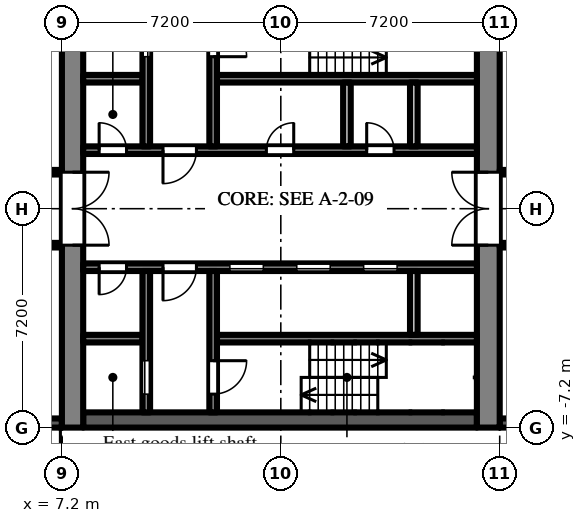
"""IFC4 building model, lengths in metres.
Left out: names, types, materials, properties, quantities, classifications, styles, units other than length and angle.
Written with IfcOpenShell. Run it as: python <this file> out.ifc"""

import sys

from ifc_helpers import new_model, si_unit, direction, frame, frame_2d, origin, place, context, subcontext, project, spatial, rectangle, extrude, element, fill, save


model = new_model("IFC4")
c1 = context("Model", 3, precision=1e-05, world=origin(), true_north=direction((0.0, 1.0)))
c2 = subcontext(c1, "Body", "Model", "MODEL_VIEW")
j1 = project(units=[si_unit("LENGTHUNIT", "METRE"), si_unit("PLANEANGLEUNIT", "RADIAN")], contexts=[c1])
p1 = place(None, origin())
s1 = spatial("IfcSite", under=j1, at=p1, CompositionType="ELEMENT")
p2 = place(p1, origin())
s2 = spatial("IfcBuilding", under=s1, at=p2, CompositionType="ELEMENT")
p3 = place(p2, frame((0.0, 0.0, 53.7)))
s3 = spatial("IfcBuildingStorey", under=s2, at=p3, CompositionType="ELEMENT", Elevation=53.7)
p4 = place(p3, frame((21.6, -7.05, 0.0), z_axis=(0.0, 0.0, 1.0), x_axis=(1.0, 0.0, 0.0)))
e1 = element("IfcWall", 1, at=p4, inside=s3, PredefinedType="SOLIDWALL", context=c2, shape_type="SweptSolid", body=[
    extrude(rectangle(XDim=2.7, YDim=0.3, at=frame_2d((1.35, 0.0))), origin(), (0.0, 0.0, 1.0), 2.1),
])
p5 = place(p4, frame((0.75, 0.0, 0.2)))
e2 = element("IfcOpeningElement", 2, at=p5, cuts=e1, PredefinedType="OPENING", context=c2, shape_type="SweptSolid", body=[
    extrude(rectangle(XDim=1.2, YDim=1.85, at=frame_2d((0.6, 0.925))), frame((0.0, 0.16, 0.0), z_axis=(0.0, -1.0, 0.0), x_axis=(1.0, 0.0, 0.0)), (0.0, 0.0, 1.0), 0.32),
])
p6 = place(p3, frame((4.2, -7.05, 0.0), z_axis=(0.0, 0.0, 1.0), x_axis=(1.0, 0.0, 0.0)))
e3 = element("IfcWall", 3, at=p6, inside=s3, PredefinedType="SOLIDWALL", context=c2, shape_type="SweptSolid", body=[
    extrude(rectangle(XDim=3.0, YDim=0.3, at=frame_2d((1.5, 0.0))), origin(), (0.0, 0.0, 1.0), 2.1),
])
p7 = place(p3, frame((7.55, -7.2, 0.0), z_axis=(0.0, 0.0, 1.0), x_axis=(0.0, 1.0, 0.0)))
e4 = element("IfcWall", 4, at=p7, inside=s3, PredefinedType="SHEAR", context=c2, shape_type="SweptSolid", body=[
    extrude(rectangle(XDim=14.4, YDim=0.7, at=frame_2d((7.2, 0.0))), origin(), (0.0, 0.0, 1.0), 2.575),
])
p8 = place(p7, frame((6.0, 0.0, 0.0)))
e5 = element("IfcOpeningElement", 5, at=p8, cuts=e4, PredefinedType="OPENING", context=c2, shape_type="SweptSolid", body=[
    extrude(rectangle(XDim=2.4, YDim=2.2, at=frame_2d((1.2, 1.1))), frame((0.0, 0.36, 0.0), z_axis=(0.0, -1.0, 0.0), x_axis=(1.0, 0.0, 0.0)), (0.0, 0.0, 1.0), 0.72),
])
p9 = place(p3, frame((21.225, -7.2, 0.0), z_axis=(0.0, 0.0, 1.0), x_axis=(0.0, 1.0, 0.0)))
e6 = element("IfcWall", 6, at=p9, inside=s3, PredefinedType="SHEAR", context=c2, shape_type="SweptSolid", body=[
    extrude(rectangle(XDim=14.4, YDim=0.75, at=frame_2d((7.2, 0.0))), origin(), (0.0, 0.0, 1.0), 2.575),
])
p10 = place(p9, frame((6.0, 0.0, 0.0)))
e7 = element("IfcOpeningElement", 7, at=p10, cuts=e6, PredefinedType="OPENING", context=c2, shape_type="SweptSolid", body=[
    extrude(rectangle(XDim=2.4, YDim=2.2, at=frame_2d((1.2, 1.1))), frame((0.0, 0.385, 0.0), z_axis=(0.0, -1.0, 0.0), x_axis=(1.0, 0.0, 0.0)), (0.0, 0.0, 1.0), 0.77),
])
p11 = place(p3, frame((7.9, 1.925, 0.0), z_axis=(0.0, 0.0, 1.0), x_axis=(1.0, 0.0, 0.0)))
e8 = element("IfcWall", 8, at=p11, inside=s3, PredefinedType="SHEAR", context=c2, shape_type="SweptSolid", body=[
    extrude(rectangle(XDim=12.95, YDim=0.25, at=frame_2d((6.475, 0.0))), origin(), (0.0, 0.0, 1.0), 2.575),
])
p12 = place(p11, frame((0.525, 0.0, 0.0)))
e9 = element("IfcOpeningElement", 9, at=p12, cuts=e8, PredefinedType="OPENING", context=c2, shape_type="SweptSolid", body=[
    extrude(rectangle(XDim=0.9, YDim=2.1, at=frame_2d((0.45, 1.05))), frame((0.0, 0.135, 0.0), z_axis=(0.0, -1.0, 0.0), x_axis=(1.0, 0.0, 0.0)), (0.0, 0.0, 1.0), 0.27),
])
p13 = place(p11, frame((2.625, 0.0, 0.0)))
e10 = element("IfcOpeningElement", 10, at=p13, cuts=e8, PredefinedType="OPENING", context=c2, shape_type="SweptSolid", body=[
    extrude(rectangle(XDim=1.1, YDim=2.1, at=frame_2d((0.55, 1.05))), frame((0.0, 0.135, 0.0), z_axis=(0.0, -1.0, 0.0), x_axis=(1.0, 0.0, 0.0)), (0.0, 0.0, 1.0), 0.27),
])
p14 = place(p11, frame((6.025, 0.0, 0.0)))
e11 = element("IfcOpeningElement", 11, at=p14, cuts=e8, PredefinedType="OPENING", context=c2, shape_type="SweptSolid", body=[
    extrude(rectangle(XDim=0.9, YDim=2.1, at=frame_2d((0.45, 1.05))), frame((0.0, 0.135, 0.0), z_axis=(0.0, -1.0, 0.0), x_axis=(1.0, 0.0, 0.0)), (0.0, 0.0, 1.0), 0.27),
])
p15 = place(p11, frame((9.325, 0.0, 0.0)))
e12 = element("IfcOpeningElement", 12, at=p15, cuts=e8, PredefinedType="OPENING", context=c2, shape_type="SweptSolid", body=[
    extrude(rectangle(XDim=0.9, YDim=2.1, at=frame_2d((0.45, 1.05))), frame((0.0, 0.135, 0.0), z_axis=(0.0, -1.0, 0.0), x_axis=(1.0, 0.0, 0.0)), (0.0, 0.0, 1.0), 0.27),
])
p16 = place(p3, frame((7.9, 4.275, 0.0), z_axis=(0.0, 0.0, 1.0), x_axis=(1.0, 0.0, 0.0)))
e13 = element("IfcWall", 13, at=p16, inside=s3, PredefinedType="SHEAR", context=c2, shape_type="SweptSolid", body=[
    extrude(rectangle(XDim=1.95, YDim=0.25, at=frame_2d((0.975, 0.0))), origin(), (0.0, 0.0, 1.0), 2.575),
])
p17 = place(p3, frame((12.3, 4.275, 0.0), z_axis=(0.0, 0.0, 1.0), x_axis=(1.0, 0.0, 0.0)))
e14 = element("IfcWall", 14, at=p17, inside=s3, PredefinedType="SHEAR", context=c2, shape_type="SweptSolid", body=[
    extrude(rectangle(XDim=8.55, YDim=0.25, at=frame_2d((4.275, 0.0))), origin(), (0.0, 0.0, 1.0), 2.575),
])
p18 = place(p3, frame((9.975, 2.05, 0.0), z_axis=(0.0, 0.0, 1.0), x_axis=(0.0, 1.0, 0.0)))
e15 = element("IfcWall", 15, at=p18, inside=s3, PredefinedType="SHEAR", context=c2, shape_type="SweptSolid", body=[
    extrude(rectangle(XDim=4.65, YDim=0.25, at=frame_2d((2.325, 0.0))), origin(), (0.0, 0.0, 1.0), 2.575),
])
p19 = place(p18, frame((2.95, 0.0, 0.0)))
e16 = element("IfcOpeningElement", 16, at=p19, cuts=e15, PredefinedType="OPENING", context=c2, shape_type="SweptSolid", body=[
    extrude(rectangle(XDim=1.1, YDim=2.1, at=frame_2d((0.55, 1.05))), frame((0.0, 0.135, 0.0), z_axis=(0.0, -1.0, 0.0), x_axis=(1.0, 0.0, 0.0)), (0.0, 0.0, 1.0), 0.27),
])
p20 = place(p3, frame((12.175, 2.05, 0.0), z_axis=(0.0, 0.0, 1.0), x_axis=(0.0, 1.0, 0.0)))
e17 = element("IfcWall", 17, at=p20, inside=s3, PredefinedType="SHEAR", context=c2, shape_type="SweptSolid", body=[
    extrude(rectangle(XDim=4.65, YDim=0.25, at=frame_2d((2.325, 0.0))), origin(), (0.0, 0.0, 1.0), 2.575),
])
p21 = place(p20, frame((2.95, 0.0, 0.0)))
e18 = element("IfcOpeningElement", 18, at=p21, cuts=e17, PredefinedType="OPENING", context=c2, shape_type="SweptSolid", body=[
    extrude(rectangle(XDim=1.1, YDim=2.1, at=frame_2d((0.55, 1.05))), frame((0.0, 0.135, 0.0), z_axis=(0.0, -1.0, 0.0), x_axis=(1.0, 0.0, 0.0)), (0.0, 0.0, 1.0), 0.27),
])
for number, where, z_axis, x_axis in (
    (19, (16.575, 2.05, 0.0), (0.0, 0.0, 1.0), (0.0, 1.0, 0.0)),
    (20, (18.775, 2.05, 0.0), (0.0, 0.0, 1.0), (0.0, 1.0, 0.0)),
):
    element("IfcWall", number, at=place(p3, frame(where, z_axis=z_axis, x_axis=x_axis)), inside=s3, PredefinedType="PARTITIONING", context=c2, shape_type="SweptSolid", body=[
        extrude(rectangle(XDim=2.1, YDim=0.25, at=frame_2d((1.05, 0.0))), origin(), (0.0, 0.0, 1.0), 2.575),
    ])
p22 = place(p3, frame((7.9, -6.95, 0.0), z_axis=(0.0, 0.0, 1.0), x_axis=(1.0, 0.0, 0.0)))
e21 = element("IfcWall", 21, at=p22, inside=s3, PredefinedType="SHEAR", context=c2, shape_type="SweptSolid", body=[
    extrude(rectangle(XDim=12.95, YDim=0.5, at=frame_2d((6.475, 0.0))), origin(), (0.0, 0.0, 1.0), 2.575),
])
p23 = place(p3, frame((7.9, -1.925, 0.0), z_axis=(0.0, 0.0, 1.0), x_axis=(1.0, 0.0, 0.0)))
e22 = element("IfcWall", 22, at=p23, inside=s3, PredefinedType="SHEAR", context=c2, shape_type="SweptSolid", body=[
    extrude(rectangle(XDim=12.95, YDim=0.25, at=frame_2d((6.475, 0.0))), origin(), (0.0, 0.0, 1.0), 2.575),
])
p24 = place(p23, frame((4.825, 0.0, 0.0)))
e23 = element("IfcOpeningElement", 23, at=p24, cuts=e22, PredefinedType="OPENING", context=c2, shape_type="SweptSolid", body=[
    extrude(rectangle(XDim=1.1, YDim=2.1, at=frame_2d((0.55, 1.05))), frame((0.0, 0.135, 0.0), z_axis=(0.0, -1.0, 0.0), x_axis=(1.0, 0.0, 0.0)), (0.0, 0.0, 1.0), 0.27),
])
p25 = place(p23, frame((7.025, 0.0, 0.0)))
e24 = element("IfcOpeningElement", 24, at=p25, cuts=e22, PredefinedType="OPENING", context=c2, shape_type="SweptSolid", body=[
    extrude(rectangle(XDim=1.1, YDim=2.1, at=frame_2d((0.55, 1.05))), frame((0.0, 0.135, 0.0), z_axis=(0.0, -1.0, 0.0), x_axis=(1.0, 0.0, 0.0)), (0.0, 0.0, 1.0), 0.27),
])
p26 = place(p23, frame((9.225, 0.0, 0.0)))
e25 = element("IfcOpeningElement", 25, at=p26, cuts=e22, PredefinedType="OPENING", context=c2, shape_type="SweptSolid", body=[
    extrude(rectangle(XDim=1.1, YDim=2.1, at=frame_2d((0.55, 1.05))), frame((0.0, 0.135, 0.0), z_axis=(0.0, -1.0, 0.0), x_axis=(1.0, 0.0, 0.0)), (0.0, 0.0, 1.0), 0.27),
])
p27 = place(p23, frame((0.525, 0.0, 0.0)))
e26 = element("IfcOpeningElement", 26, at=p27, cuts=e22, PredefinedType="OPENING", context=c2, shape_type="SweptSolid", body=[
    extrude(rectangle(XDim=0.9, YDim=2.1, at=frame_2d((0.45, 1.05))), frame((0.0, 0.135, 0.0), z_axis=(0.0, -1.0, 0.0), x_axis=(1.0, 0.0, 0.0)), (0.0, 0.0, 1.0), 0.27),
])
p28 = place(p23, frame((2.625, 0.0, 0.0)))
e27 = element("IfcOpeningElement", 27, at=p28, cuts=e22, PredefinedType="OPENING", context=c2, shape_type="SweptSolid", body=[
    extrude(rectangle(XDim=1.1, YDim=2.1, at=frame_2d((0.55, 1.05))), frame((0.0, 0.135, 0.0), z_axis=(0.0, -1.0, 0.0), x_axis=(1.0, 0.0, 0.0)), (0.0, 0.0, 1.0), 0.27),
])
p29 = place(p3, frame((7.9, -4.275, 0.0), z_axis=(0.0, 0.0, 1.0), x_axis=(1.0, 0.0, 0.0)))
e28 = element("IfcWall", 28, at=p29, inside=s3, PredefinedType="SHEAR", context=c2, shape_type="SweptSolid", body=[
    extrude(rectangle(XDim=1.95, YDim=0.25, at=frame_2d((0.975, 0.0))), origin(), (0.0, 0.0, 1.0), 2.575),
])
p30 = place(p3, frame((12.3, -4.275, 0.0), z_axis=(0.0, 0.0, 1.0), x_axis=(1.0, 0.0, 0.0)))
e29 = element("IfcWall", 29, at=p30, inside=s3, PredefinedType="SHEAR", context=c2, shape_type="SweptSolid", body=[
    extrude(rectangle(XDim=8.55, YDim=0.25, at=frame_2d((4.275, 0.0))), origin(), (0.0, 0.0, 1.0), 2.575),
])
p31 = place(p3, frame((9.975, -2.05, 0.0), z_axis=(0.0, 0.0, 1.0), x_axis=(0.0, -1.0, 0.0)))
e30 = element("IfcWall", 30, at=p31, inside=s3, PredefinedType="SHEAR", context=c2, shape_type="SweptSolid", body=[
    extrude(rectangle(XDim=4.65, YDim=0.25, at=frame_2d((2.325, 0.0))), origin(), (0.0, 0.0, 1.0), 2.575),
])
p32 = place(p31, frame((2.95, 0.0, 0.0)))
e31 = element("IfcOpeningElement", 31, at=p32, cuts=e30, PredefinedType="OPENING", context=c2, shape_type="SweptSolid", body=[
    extrude(rectangle(XDim=1.1, YDim=2.1, at=frame_2d((0.55, 1.05))), frame((0.0, 0.135, 0.0), z_axis=(0.0, -1.0, 0.0), x_axis=(1.0, 0.0, 0.0)), (0.0, 0.0, 1.0), 0.27),
])
p33 = place(p3, frame((12.175, -2.05, 0.0), z_axis=(0.0, 0.0, 1.0), x_axis=(0.0, -1.0, 0.0)))
e32 = element("IfcWall", 32, at=p33, inside=s3, PredefinedType="SHEAR", context=c2, shape_type="SweptSolid", body=[
    extrude(rectangle(XDim=4.65, YDim=0.25, at=frame_2d((2.325, 0.0))), origin(), (0.0, 0.0, 1.0), 2.575),
])
p34 = place(p33, frame((2.95, 0.0, 0.0)))
e33 = element("IfcOpeningElement", 33, at=p34, cuts=e32, PredefinedType="OPENING", context=c2, shape_type="SweptSolid", body=[
    extrude(rectangle(XDim=1.1, YDim=2.1, at=frame_2d((0.55, 1.05))), frame((0.0, 0.135, 0.0), z_axis=(0.0, -1.0, 0.0), x_axis=(1.0, 0.0, 0.0)), (0.0, 0.0, 1.0), 0.27),
])
p35 = place(p3, frame((18.775, -2.05, 0.0), z_axis=(0.0, 0.0, 1.0), x_axis=(0.0, -1.0, 0.0)))
e34 = element("IfcWall", 34, at=p35, inside=s3, PredefinedType="PARTITIONING", context=c2, shape_type="SweptSolid", body=[
    extrude(rectangle(XDim=2.1, YDim=0.25, at=frame_2d((1.05, 0.0))), origin(), (0.0, 0.0, 1.0), 2.575),
])
p36 = place(p3, frame((1.275, -1.2, 0.0), z_axis=(0.0, 0.0, 1.0), x_axis=(1.0, 0.0, 0.0)))
e35 = element("IfcWall", 35, at=p36, inside=s3, PredefinedType="PARTITIONING", context=c2, shape_type="SweptSolid", body=[
    extrude(rectangle(XDim=5.925, YDim=0.15, at=frame_2d((2.962, 0.0))), origin(), (0.0, 0.0, 1.0), 2.575),
])
p37 = place(p36, frame((3.075, 0.0, 0.0)))
e36 = element("IfcOpeningElement", 36, at=p37, cuts=e35, PredefinedType="OPENING", context=c2, shape_type="SweptSolid", body=[
    extrude(rectangle(XDim=0.9, YDim=2.1, at=frame_2d((0.45, 1.05))), frame((0.0, 0.085, 0.0), z_axis=(0.0, -1.0, 0.0), x_axis=(1.0, 0.0, 0.0)), (0.0, 0.0, 1.0), 0.17),
])
p38 = place(p3, frame((1.275, 1.2, 0.0), z_axis=(0.0, 0.0, 1.0), x_axis=(1.0, 0.0, 0.0)))
e37 = element("IfcWall", 37, at=p38, inside=s3, PredefinedType="PARTITIONING", context=c2, shape_type="SweptSolid", body=[
    extrude(rectangle(XDim=5.925, YDim=0.15, at=frame_2d((2.962, 0.0))), origin(), (0.0, 0.0, 1.0), 2.575),
])
p39 = place(p38, frame((4.475, 0.0, 0.0)))
e38 = element("IfcOpeningElement", 38, at=p39, cuts=e37, PredefinedType="OPENING", context=c2, shape_type="SweptSolid", body=[
    extrude(rectangle(XDim=0.9, YDim=2.1, at=frame_2d((0.45, 1.05))), frame((0.0, 0.085, 0.0), z_axis=(0.0, -1.0, 0.0), x_axis=(1.0, 0.0, 0.0)), (0.0, 0.0, 1.0), 0.17),
])
p40 = place(p3, frame((21.6, -1.2, 0.0), z_axis=(0.0, 0.0, 1.0), x_axis=(1.0, 0.0, 0.0)))
e39 = element("IfcWall", 39, at=p40, inside=s3, PredefinedType="PARTITIONING", context=c2, shape_type="SweptSolid", body=[
    extrude(rectangle(XDim=14.9, YDim=0.15, at=frame_2d((7.45, 0.0))), origin(), (0.0, 0.0, 1.0), 2.575),
])
p41 = place(p40, frame((3.8, 0.0, 0.0)))
e40 = element("IfcOpeningElement", 40, at=p41, cuts=e39, PredefinedType="OPENING", context=c2, shape_type="SweptSolid", body=[
    extrude(rectangle(XDim=1.0, YDim=2.1, at=frame_2d((0.5, 1.05))), frame((0.0, 0.085, 0.0), z_axis=(0.0, -1.0, 0.0), x_axis=(1.0, 0.0, 0.0)), (0.0, 0.0, 1.0), 0.17),
])
p42 = place(p40, frame((9.2, 0.0, 0.0)))
e41 = element("IfcOpeningElement", 41, at=p42, cuts=e39, PredefinedType="OPENING", context=c2, shape_type="SweptSolid", body=[
    extrude(rectangle(XDim=1.0, YDim=2.1, at=frame_2d((0.5, 1.05))), frame((0.0, 0.085, 0.0), z_axis=(0.0, -1.0, 0.0), x_axis=(1.0, 0.0, 0.0)), (0.0, 0.0, 1.0), 0.17),
])
p43 = place(p40, frame((11.95, 0.0, 0.0)))
e42 = element("IfcOpeningElement", 42, at=p43, cuts=e39, PredefinedType="OPENING", context=c2, shape_type="SweptSolid", body=[
    extrude(rectangle(XDim=1.8, YDim=2.1, at=frame_2d((0.9, 1.05))), frame((0.0, 0.085, 0.0), z_axis=(0.0, -1.0, 0.0), x_axis=(1.0, 0.0, 0.0)), (0.0, 0.0, 1.0), 0.17),
])
p44 = place(p3, frame((21.6, 1.2, 0.0), z_axis=(0.0, 0.0, 1.0), x_axis=(1.0, 0.0, 0.0)))
e43 = element("IfcWall", 43, at=p44, inside=s3, PredefinedType="PARTITIONING", context=c2, shape_type="SweptSolid", body=[
    extrude(rectangle(XDim=14.9, YDim=0.15, at=frame_2d((7.45, 0.0))), origin(), (0.0, 0.0, 1.0), 2.575),
])
p45 = place(p44, frame((6.0, 0.0, 0.0)))
e44 = element("IfcOpeningElement", 44, at=p45, cuts=e43, PredefinedType="OPENING", context=c2, shape_type="SweptSolid", body=[
    extrude(rectangle(XDim=1.0, YDim=2.1, at=frame_2d((0.5, 1.05))), frame((0.0, 0.085, 0.0), z_axis=(0.0, -1.0, 0.0), x_axis=(1.0, 0.0, 0.0)), (0.0, 0.0, 1.0), 0.17),
])
p46 = place(p44, frame((7.65, 0.0, 0.0)))
e45 = element("IfcOpeningElement", 45, at=p46, cuts=e43, PredefinedType="OPENING", context=c2, shape_type="SweptSolid", body=[
    extrude(rectangle(XDim=0.9, YDim=2.1, at=frame_2d((0.45, 1.05))), frame((0.0, 0.085, 0.0), z_axis=(0.0, -1.0, 0.0), x_axis=(1.0, 0.0, 0.0)), (0.0, 0.0, 1.0), 0.17),
])
p47 = place(p44, frame((9.45, 0.0, 0.0)))
e46 = element("IfcOpeningElement", 46, at=p47, cuts=e43, PredefinedType="OPENING", context=c2, shape_type="SweptSolid", body=[
    extrude(rectangle(XDim=0.9, YDim=2.1, at=frame_2d((0.45, 1.05))), frame((0.0, 0.085, 0.0), z_axis=(0.0, -1.0, 0.0), x_axis=(1.0, 0.0, 0.0)), (0.0, 0.0, 1.0), 0.17),
])
p48 = place(p44, frame((11.95, 0.0, 0.0)))
e47 = element("IfcOpeningElement", 47, at=p48, cuts=e43, PredefinedType="OPENING", context=c2, shape_type="SweptSolid", body=[
    extrude(rectangle(XDim=1.8, YDim=2.1, at=frame_2d((0.9, 1.05))), frame((0.0, 0.085, 0.0), z_axis=(0.0, -1.0, 0.0), x_axis=(1.0, 0.0, 0.0)), (0.0, 0.0, 1.0), 0.17),
])
p49 = place(p24, origin())
e48 = element("IfcDoor", 48, at=p49, inside=s3, OperationType="SLIDING_TO_LEFT", PredefinedType="DOOR", context=c2, shape_type="SweptSolid", body=[
    extrude(rectangle(XDim=1.1, YDim=2.1, at=frame_2d((0.55, 1.05))), frame((0.0, 0.025, 0.0), z_axis=(0.0, -1.0, 0.0), x_axis=(1.0, 0.0, 0.0)), (0.0, 0.0, 1.0), 0.05),
])
fill(e23, e48)
p50 = place(p25, origin())
e49 = element("IfcDoor", 49, at=p50, inside=s3, OperationType="SLIDING_TO_LEFT", PredefinedType="DOOR", context=c2, shape_type="SweptSolid", body=[
    extrude(rectangle(XDim=1.1, YDim=2.1, at=frame_2d((0.55, 1.05))), frame((0.0, 0.025, 0.0), z_axis=(0.0, -1.0, 0.0), x_axis=(1.0, 0.0, 0.0)), (0.0, 0.0, 1.0), 0.05),
])
fill(e24, e49)
p51 = place(p26, origin())
e50 = element("IfcDoor", 50, at=p51, inside=s3, OperationType="SLIDING_TO_LEFT", PredefinedType="DOOR", context=c2, shape_type="SweptSolid", body=[
    extrude(rectangle(XDim=1.1, YDim=2.1, at=frame_2d((0.55, 1.05))), frame((0.0, 0.025, 0.0), z_axis=(0.0, -1.0, 0.0), x_axis=(1.0, 0.0, 0.0)), (0.0, 0.0, 1.0), 0.05),
])
fill(e25, e50)
p52 = place(p19, origin())
e51 = element("IfcDoor", 51, at=p52, inside=s3, OperationType="SLIDING_TO_LEFT", PredefinedType="DOOR", context=c2, shape_type="SweptSolid", body=[
    extrude(rectangle(XDim=1.1, YDim=2.1, at=frame_2d((0.55, 1.05))), frame((0.0, 0.025, 0.0), z_axis=(0.0, -1.0, 0.0), x_axis=(1.0, 0.0, 0.0)), (0.0, 0.0, 1.0), 0.05),
])
fill(e16, e51)
p53 = place(p32, origin())
e52 = element("IfcDoor", 52, at=p53, inside=s3, OperationType="SLIDING_TO_LEFT", PredefinedType="DOOR", context=c2, shape_type="SweptSolid", body=[
    extrude(rectangle(XDim=1.1, YDim=2.1, at=frame_2d((0.55, 1.05))), frame((0.0, 0.025, 0.0), z_axis=(0.0, -1.0, 0.0), x_axis=(1.0, 0.0, 0.0)), (0.0, 0.0, 1.0), 0.05),
])
fill(e31, e52)
p54 = place(p21, frame((1.1, 0.0, 0.0), z_axis=(0.0, 0.0, 1.0), x_axis=(-1.0, 0.0, 0.0)))
e53 = element("IfcDoor", 53, at=p54, inside=s3, OperationType="SINGLE_SWING_RIGHT", PredefinedType="DOOR", context=c2, shape_type="SweptSolid", body=[
    extrude(rectangle(XDim=1.1, YDim=2.1, at=frame_2d((0.55, 1.05))), frame((0.0, 0.025, 0.0), z_axis=(0.0, -1.0, 0.0), x_axis=(1.0, 0.0, 0.0)), (0.0, 0.0, 1.0), 0.05),
])
fill(e18, e53)
p55 = place(p34, origin())
e54 = element("IfcDoor", 54, at=p55, inside=s3, OperationType="SINGLE_SWING_LEFT", PredefinedType="DOOR", context=c2, shape_type="SweptSolid", body=[
    extrude(rectangle(XDim=1.1, YDim=2.1, at=frame_2d((0.55, 1.05))), frame((0.0, 0.025, 0.0), z_axis=(0.0, -1.0, 0.0), x_axis=(1.0, 0.0, 0.0)), (0.0, 0.0, 1.0), 0.05),
])
fill(e33, e54)
p56 = place(p12, origin())
e55 = element("IfcDoor", 55, at=p56, inside=s3, OperationType="SINGLE_SWING_LEFT", PredefinedType="DOOR", context=c2, shape_type="SweptSolid", body=[
    extrude(rectangle(XDim=0.9, YDim=2.1, at=frame_2d((0.45, 1.05))), frame((0.0, 0.025, 0.0), z_axis=(0.0, -1.0, 0.0), x_axis=(1.0, 0.0, 0.0)), (0.0, 0.0, 1.0), 0.05),
])
fill(e9, e55)
p57 = place(p27, frame((0.9, 0.0, 0.0), z_axis=(0.0, 0.0, 1.0), x_axis=(-1.0, 0.0, 0.0)))
e56 = element("IfcDoor", 56, at=p57, inside=s3, OperationType="SINGLE_SWING_RIGHT", PredefinedType="DOOR", context=c2, shape_type="SweptSolid", body=[
    extrude(rectangle(XDim=0.9, YDim=2.1, at=frame_2d((0.45, 1.05))), frame((0.0, 0.025, 0.0), z_axis=(0.0, -1.0, 0.0), x_axis=(1.0, 0.0, 0.0)), (0.0, 0.0, 1.0), 0.05),
])
fill(e26, e56)
p58 = place(p13, frame((1.1, 0.0, 0.0), z_axis=(0.0, 0.0, 1.0), x_axis=(-1.0, 0.0, 0.0)))
e57 = element("IfcDoor", 57, at=p58, inside=s3, OperationType="SINGLE_SWING_RIGHT", PredefinedType="DOOR", context=c2, shape_type="SweptSolid", body=[
    extrude(rectangle(XDim=1.1, YDim=2.1, at=frame_2d((0.55, 1.05))), frame((0.0, 0.025, 0.0), z_axis=(0.0, -1.0, 0.0), x_axis=(1.0, 0.0, 0.0)), (0.0, 0.0, 1.0), 0.05),
])
fill(e10, e57)
p59 = place(p28, frame((1.1, 0.0, 0.0), z_axis=(0.0, 0.0, 1.0), x_axis=(-1.0, 0.0, 0.0)))
e58 = element("IfcDoor", 58, at=p59, inside=s3, OperationType="SINGLE_SWING_RIGHT", PredefinedType="DOOR", context=c2, shape_type="SweptSolid", body=[
    extrude(rectangle(XDim=1.1, YDim=2.1, at=frame_2d((0.55, 1.05))), frame((0.0, 0.025, 0.0), z_axis=(0.0, -1.0, 0.0), x_axis=(1.0, 0.0, 0.0)), (0.0, 0.0, 1.0), 0.05),
])
fill(e27, e58)
p60 = place(p8, frame((2.4, 0.0, 0.0), z_axis=(0.0, 0.0, 1.0), x_axis=(-1.0, 0.0, 0.0)))
e59 = element("IfcDoor", 59, at=p60, inside=s3, OperationType="DOUBLE_DOOR_DOUBLE_SWING", PredefinedType="DOOR", context=c2, shape_type="SweptSolid", body=[
    extrude(rectangle(XDim=2.4, YDim=2.2, at=frame_2d((1.2, 1.1))), frame((0.0, 0.025, 0.0), z_axis=(0.0, -1.0, 0.0), x_axis=(1.0, 0.0, 0.0)), (0.0, 0.0, 1.0), 0.05),
])
fill(e5, e59)
p61 = place(p10, origin())
e60 = element("IfcDoor", 60, at=p61, inside=s3, OperationType="DOUBLE_DOOR_DOUBLE_SWING", PredefinedType="DOOR", context=c2, shape_type="SweptSolid", body=[
    extrude(rectangle(XDim=2.4, YDim=2.2, at=frame_2d((1.2, 1.1))), frame((0.0, 0.025, 0.0), z_axis=(0.0, -1.0, 0.0), x_axis=(1.0, 0.0, 0.0)), (0.0, 0.0, 1.0), 0.05),
])
fill(e7, e60)
p62 = place(p14, origin())
e61 = element("IfcDoor", 61, at=p62, inside=s3, OperationType="SINGLE_SWING_RIGHT", PredefinedType="DOOR", context=c2, shape_type="SweptSolid", body=[
    extrude(rectangle(XDim=0.9, YDim=2.1, at=frame_2d((0.45, 1.05))), frame((0.0, 0.025, 0.0), z_axis=(0.0, -1.0, 0.0), x_axis=(1.0, 0.0, 0.0)), (0.0, 0.0, 1.0), 0.05),
])
fill(e11, e61)
p63 = place(p15, origin())
e62 = element("IfcDoor", 62, at=p63, inside=s3, OperationType="SINGLE_SWING_LEFT", PredefinedType="DOOR", context=c2, shape_type="SweptSolid", body=[
    extrude(rectangle(XDim=0.9, YDim=2.1, at=frame_2d((0.45, 1.05))), frame((0.0, 0.025, 0.0), z_axis=(0.0, -1.0, 0.0), x_axis=(1.0, 0.0, 0.0)), (0.0, 0.0, 1.0), 0.05),
])
fill(e12, e62)
save(model, sys.argv[1])
